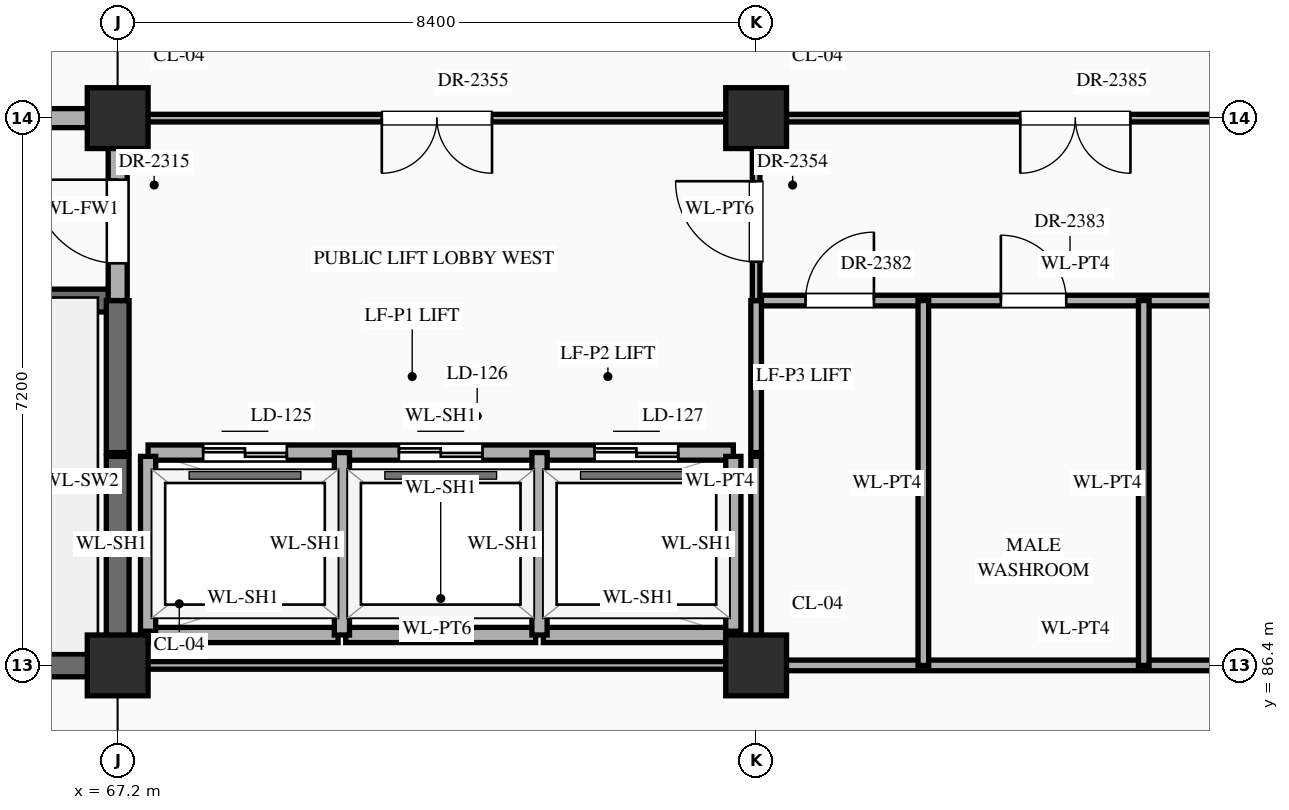
"""IFC4 building model, lengths in metres.
Left out: names, types, materials, properties, quantities, classifications, styles, units other than length and angle.
Written with IfcOpenShell. Run it as: python <this file> out.ifc"""

import sys

from ifc_helpers import new_model, si_unit, direction, frame, frame_2d, origin, origin_2d, place, context, subcontext, project, spatial, rectangle, extrude, element, fill, save


model = new_model("IFC4")
c1 = context("Model", 3, precision=1e-05, world=origin(), true_north=direction((0.0, 1.0)))
c2 = subcontext(c1, "Body", "Model", "MODEL_VIEW")
j1 = project(units=[si_unit("LENGTHUNIT", "METRE"), si_unit("PLANEANGLEUNIT", "RADIAN")], contexts=[c1])
p1 = place(None, origin())
s1 = spatial("IfcSite", under=j1, at=p1, CompositionType="ELEMENT")
p2 = place(p1, origin())
s2 = spatial("IfcBuilding", under=s1, at=p2, CompositionType="ELEMENT")
p3 = place(p2, frame((0.0, 0.0, 30.6)))
s3 = spatial("IfcBuildingStorey", under=s2, at=p3, CompositionType="ELEMENT", Elevation=30.6)
for number, where, z_axis, x_axis in (
    (1, (67.2, 86.4, 0.0), (0.0, 0.0, 1.0), (1.0, 0.0, 0.0)),
    (2, (67.2, 93.6, 0.0), (0.0, 0.0, 1.0), (1.0, 0.0, 0.0)),
    (3, (75.6, 86.4, 0.0), (0.0, 0.0, 1.0), (1.0, 0.0, 0.0)),
    (4, (75.6, 93.6, 0.0), (0.0, 0.0, 1.0), (1.0, 0.0, 0.0)),
):
    element("IfcColumn", number, at=place(p3, frame(where, z_axis=z_axis, x_axis=x_axis)), inside=s3, PredefinedType="COLUMN", context=c2, shape_type="SweptSolid", body=[
        extrude(rectangle(XDim=0.8, YDim=0.8, at=origin_2d()), origin(), (0.0, 0.0, 1.0), 4.5),
    ])
p4 = place(p3, frame((58.8, 86.4, 0.0), z_axis=(0.0, 0.0, 1.0), x_axis=(1.0, 0.0, 0.0)))
e5 = element("IfcWall", 5, at=p4, inside=s3, PredefinedType="SHEAR", context=c2, shape_type="SweptSolid", body=[
    extrude(rectangle(XDim=8.4, YDim=0.3, at=frame_2d((4.2, 0.0))), origin(), (0.0, 0.0, 1.0), 4.24),
])
p5 = place(p3, frame((67.25, 86.4, 0.0), z_axis=(0.0, 0.0, 1.0), x_axis=(1.0, 0.0, 0.0)))
e6 = element("IfcWall", 6, at=p5, inside=s3, PredefinedType="STANDARD", context=c2, shape_type="SweptSolid", body=[
    extrude(rectangle(XDim=8.3, YDim=0.1, at=frame_2d((4.15, 0.0))), origin(), (0.0, 0.0, 1.0), 3.39),
])
p6 = place(p3, frame((75.6, 86.4, 0.0), z_axis=(0.0, 0.0, 1.0), x_axis=(1.0, 0.0, 0.0)))
e7 = element("IfcWall", 7, at=p6, inside=s3, PredefinedType="STANDARD", context=c2, shape_type="SweptSolid", body=[
    extrude(rectangle(XDim=8.4, YDim=0.14, at=frame_2d((4.2, 0.0))), origin(), (0.0, 0.0, 1.0), 3.39),
])
for number, where, z_axis, x_axis in (
    (8, (67.6, 86.8, 0.0), (0.0, 0.0, 1.0), (1.0, 0.0, 0.0)),
    (9, (70.2, 86.8, 0.0), (0.0, 0.0, 1.0), (1.0, 0.0, 0.0)),
    (10, (72.8, 86.8, 0.0), (0.0, 0.0, 1.0), (1.0, 0.0, 0.0)),
):
    element("IfcWall", number, at=place(p3, frame(where, z_axis=z_axis, x_axis=x_axis)), inside=s3, PredefinedType="STANDARD", context=c2, shape_type="SweptSolid", body=[
        extrude(rectangle(XDim=2.5, YDim=0.2, at=frame_2d((1.25, 0.0))), origin(), (0.0, 0.0, 1.0), 4.24),
    ])
p7 = place(p3, frame((67.6, 89.2, 0.0), z_axis=(0.0, 0.0, 1.0), x_axis=(1.0, 0.0, 0.0)))
e11 = element("IfcWall", 11, at=p7, inside=s3, PredefinedType="STANDARD", context=c2, shape_type="SweptSolid", body=[
    extrude(rectangle(XDim=7.7, YDim=0.2, at=frame_2d((3.85, 0.0))), origin(), (0.0, 0.0, 1.0), 4.24),
])
p8 = place(p7, frame((0.725, 0.0, 0.0)))
e12 = element("IfcOpeningElement", 12, at=p8, cuts=e11, PredefinedType="OPENING", context=c2, shape_type="SweptSolid", body=[
    extrude(rectangle(XDim=1.1, YDim=2.15, at=frame_2d((0.55, 1.075))), frame((0.0, 0.112, 0.0), z_axis=(0.0, -1.0, 0.0), x_axis=(1.0, 0.0, 0.0)), (0.0, 0.0, 1.0), 0.224),
])
p9 = place(p7, frame((3.3, 0.0, 0.0)))
e13 = element("IfcOpeningElement", 13, at=p9, cuts=e11, PredefinedType="OPENING", context=c2, shape_type="SweptSolid", body=[
    extrude(rectangle(XDim=1.1, YDim=2.15, at=frame_2d((0.55, 1.075))), frame((0.0, 0.112, 0.0), z_axis=(0.0, -1.0, 0.0), x_axis=(1.0, 0.0, 0.0)), (0.0, 0.0, 1.0), 0.224),
])
p10 = place(p7, frame((5.875, 0.0, 0.0)))
e14 = element("IfcOpeningElement", 14, at=p10, cuts=e11, PredefinedType="OPENING", context=c2, shape_type="SweptSolid", body=[
    extrude(rectangle(XDim=1.1, YDim=2.15, at=frame_2d((0.55, 1.075))), frame((0.0, 0.112, 0.0), z_axis=(0.0, -1.0, 0.0), x_axis=(1.0, 0.0, 0.0)), (0.0, 0.0, 1.0), 0.224),
])
p11 = place(p3, frame((58.8, 91.2, 0.0), z_axis=(0.0, 0.0, 1.0), x_axis=(1.0, 0.0, 0.0)))
e15 = element("IfcWall", 15, at=p11, inside=s3, PredefinedType="SHEAR", context=c2, shape_type="SweptSolid", body=[
    extrude(rectangle(XDim=8.4, YDim=0.3, at=frame_2d((4.2, 0.0))), origin(), (0.0, 0.0, 1.0), 4.24),
])
p12 = place(p11, frame((0.65, 0.0, 0.0)))
e16 = element("IfcOpeningElement", 16, at=p12, cuts=e15, PredefinedType="OPENING", context=c2, shape_type="SweptSolid", body=[
    extrude(rectangle(XDim=1.1, YDim=2.2, at=frame_2d((0.55, 1.1))), frame((0.0, 0.162, 0.0), z_axis=(0.0, -1.0, 0.0), x_axis=(1.0, 0.0, 0.0)), (0.0, 0.0, 1.0), 0.324),
])
p13 = place(p3, frame((75.6, 91.2, 0.0), z_axis=(0.0, 0.0, 1.0), x_axis=(1.0, 0.0, 0.0)))
e17 = element("IfcWall", 17, at=p13, inside=s3, PredefinedType="STANDARD", context=c2, shape_type="SweptSolid", body=[
    extrude(rectangle(XDim=8.4, YDim=0.14, at=frame_2d((4.2, 0.0))), origin(), (0.0, 0.0, 1.0), 4.24),
])
p14 = place(p13, frame((0.65, 0.0, 0.0)))
e18 = element("IfcOpeningElement", 18, at=p14, cuts=e17, PredefinedType="OPENING", context=c2, shape_type="SweptSolid", body=[
    extrude(rectangle(XDim=0.9, YDim=2.15, at=frame_2d((0.45, 1.075))), frame((0.0, 0.082, 0.0), z_axis=(0.0, -1.0, 0.0), x_axis=(1.0, 0.0, 0.0)), (0.0, 0.0, 1.0), 0.164),
])
p15 = place(p13, frame((3.22, 0.0, 0.0)))
e19 = element("IfcOpeningElement", 19, at=p15, cuts=e17, PredefinedType="OPENING", context=c2, shape_type="SweptSolid", body=[
    extrude(rectangle(XDim=0.86, YDim=2.1, at=frame_2d((0.43, 1.05))), frame((0.0, 0.082, 0.0), z_axis=(0.0, -1.0, 0.0), x_axis=(1.0, 0.0, 0.0)), (0.0, 0.0, 1.0), 0.164),
])
p16 = place(p13, frame((6.32, 0.0, 0.0)))
e20 = element("IfcOpeningElement", 20, at=p16, cuts=e17, PredefinedType="OPENING", context=c2, shape_type="SweptSolid", body=[
    extrude(rectangle(XDim=0.86, YDim=2.1, at=frame_2d((0.43, 1.05))), frame((0.0, 0.082, 0.0), z_axis=(0.0, -1.0, 0.0), x_axis=(1.0, 0.0, 0.0)), (0.0, 0.0, 1.0), 0.164),
])
p17 = place(p3, frame((58.8, 93.6, 0.0), z_axis=(0.0, 0.0, 1.0), x_axis=(1.0, 0.0, 0.0)))
e21 = element("IfcWall", 21, at=p17, inside=s3, PredefinedType="STANDARD", context=c2, shape_type="SweptSolid", body=[
    extrude(rectangle(XDim=8.4, YDim=0.25, at=frame_2d((4.2, 0.0))), origin(), (0.0, 0.0, 1.0), 3.39),
])
p18 = place(p17, frame((3.2, 0.0, 0.0)))
e22 = element("IfcOpeningElement", 22, at=p18, cuts=e21, PredefinedType="OPENING", context=c2, shape_type="SweptSolid", body=[
    extrude(rectangle(XDim=2.0, YDim=2.4, at=frame_2d((1.0, 1.2))), frame((0.0, 0.137, 0.0), z_axis=(0.0, -1.0, 0.0), x_axis=(1.0, 0.0, 0.0)), (0.0, 0.0, 1.0), 0.274),
])
p19 = place(p3, frame((67.2, 93.6, 0.0), z_axis=(0.0, 0.0, 1.0), x_axis=(1.0, 0.0, 0.0)))
e23 = element("IfcWall", 23, at=p19, inside=s3, PredefinedType="STANDARD", context=c2, shape_type="SweptSolid", body=[
    extrude(rectangle(XDim=33.6, YDim=0.1, at=frame_2d((16.8, 0.0))), origin(), (0.0, 0.0, 1.0), 3.39),
])
p20 = place(p19, frame((3.475, 0.0, 0.0)))
e24 = element("IfcOpeningElement", 24, at=p20, cuts=e23, PredefinedType="OPENING", context=c2, shape_type="SweptSolid", body=[
    extrude(rectangle(XDim=1.45, YDim=2.3, at=frame_2d((0.725, 1.15))), frame((0.0, 0.062, 0.0), z_axis=(0.0, -1.0, 0.0), x_axis=(1.0, 0.0, 0.0)), (0.0, 0.0, 1.0), 0.124),
])
p21 = place(p19, frame((28.45, 0.0, 0.0)))
e25 = element("IfcOpeningElement", 25, at=p21, cuts=e23, PredefinedType="OPENING", context=c2, shape_type="SweptSolid", body=[
    extrude(rectangle(XDim=1.9, YDim=2.5, at=frame_2d((0.95, 1.25))), frame((0.0, 0.062, 0.0), z_axis=(0.0, -1.0, 0.0), x_axis=(1.0, 0.0, 0.0)), (0.0, 0.0, 1.0), 0.124),
])
p22 = place(p19, frame((11.875, 0.0, 0.0)))
e26 = element("IfcOpeningElement", 26, at=p22, cuts=e23, PredefinedType="OPENING", context=c2, shape_type="SweptSolid", body=[
    extrude(rectangle(XDim=1.45, YDim=2.3, at=frame_2d((0.725, 1.15))), frame((0.0, 0.062, 0.0), z_axis=(0.0, -1.0, 0.0), x_axis=(1.0, 0.0, 0.0)), (0.0, 0.0, 1.0), 0.124),
])
p23 = place(p19, frame((17.76, 0.0, 0.0)))
e27 = element("IfcOpeningElement", 27, at=p23, cuts=e23, PredefinedType="OPENING", context=c2, shape_type="SweptSolid", body=[
    extrude(rectangle(XDim=1.2, YDim=2.35, at=frame_2d((0.6, 1.175))), frame((0.0, 0.062, 0.0), z_axis=(0.0, -1.0, 0.0), x_axis=(1.0, 0.0, 0.0)), (0.0, 0.0, 1.0), 0.124),
])
p24 = place(p19, frame((20.38, 0.0, 0.0)))
e28 = element("IfcOpeningElement", 28, at=p24, cuts=e23, PredefinedType="OPENING", context=c2, shape_type="SweptSolid", body=[
    extrude(rectangle(XDim=1.24, YDim=2.3, at=frame_2d((0.62, 1.15))), frame((0.0, 0.062, 0.0), z_axis=(0.0, -1.0, 0.0), x_axis=(1.0, 0.0, 0.0)), (0.0, 0.0, 1.0), 0.124),
])
p25 = place(p19, frame((23.0, 0.0, 0.0)))
e29 = element("IfcOpeningElement", 29, at=p25, cuts=e23, PredefinedType="OPENING", context=c2, shape_type="SweptSolid", body=[
    extrude(rectangle(XDim=1.28, YDim=2.35, at=frame_2d((0.64, 1.175))), frame((0.0, 0.062, 0.0), z_axis=(0.0, -1.0, 0.0), x_axis=(1.0, 0.0, 0.0)), (0.0, 0.0, 1.0), 0.124),
])
p26 = place(p3, frame((67.2, 86.45, 0.0), z_axis=(0.0, 0.0, 1.0), x_axis=(0.0, 1.0, 0.0)))
e30 = element("IfcWall", 30, at=p26, inside=s3, PredefinedType="SHEAR", context=c2, shape_type="SweptSolid", body=[
    extrude(rectangle(XDim=2.7, YDim=0.3, at=frame_2d((1.35, 0.0))), origin(), (0.0, 0.0, 1.0), 4.24),
])
p27 = place(p3, frame((67.2, 89.2, 0.0), z_axis=(0.0, 0.0, 1.0), x_axis=(0.0, 1.0, 0.0)))
e31 = element("IfcWall", 31, at=p27, inside=s3, PredefinedType="SHEAR", context=c2, shape_type="SweptSolid", body=[
    extrude(rectangle(XDim=2.0, YDim=0.3, at=frame_2d((1.0, 0.0))), origin(), (0.0, 0.0, 1.0), 4.24),
])
p28 = place(p3, frame((67.2, 91.2, 0.0), z_axis=(0.0, 0.0, 1.0), x_axis=(0.0, 1.0, 0.0)))
e32 = element("IfcWall", 32, at=p28, inside=s3, PredefinedType="STANDARD", context=c2, shape_type="SweptSolid", body=[
    extrude(rectangle(XDim=2.4, YDim=0.25, at=frame_2d((1.2, 0.0))), origin(), (0.0, 0.0, 1.0), 3.49),
])
p29 = place(p28, frame((0.49, 0.0, 0.0)))
e33 = element("IfcOpeningElement", 33, at=p29, cuts=e32, PredefinedType="OPENING", context=c2, shape_type="SweptSolid", body=[
    extrude(rectangle(XDim=1.1, YDim=2.2, at=frame_2d((0.55, 1.1))), frame((0.0, 0.137, 0.0), z_axis=(0.0, -1.0, 0.0), x_axis=(1.0, 0.0, 0.0)), (0.0, 0.0, 1.0), 0.274),
])
p30 = place(p3, frame((67.6, 86.85, 0.0), z_axis=(0.0, 0.0, 1.0), x_axis=(0.0, 1.0, 0.0)))
e34 = element("IfcWall", 34, at=p30, inside=s3, PredefinedType="STANDARD", context=c2, shape_type="SweptSolid", body=[
    extrude(rectangle(XDim=2.3, YDim=0.2, at=frame_2d((1.15, 0.0))), origin(), (0.0, 0.0, 1.0), 4.24),
])
for number, where, z_axis, x_axis in (
    (35, (70.15, 86.8, 0.0), (0.0, 0.0, 1.0), (0.0, 1.0, 0.0)),
    (36, (72.75, 86.8, 0.0), (0.0, 0.0, 1.0), (0.0, 1.0, 0.0)),
):
    element("IfcWall", number, at=place(p3, frame(where, z_axis=z_axis, x_axis=x_axis)), inside=s3, PredefinedType="STANDARD", context=c2, shape_type="SweptSolid", body=[
        extrude(rectangle(XDim=2.4, YDim=0.2, at=frame_2d((1.2, 0.0))), origin(), (0.0, 0.0, 1.0), 4.24),
    ])
p31 = place(p3, frame((75.3, 86.85, 0.0), z_axis=(0.0, 0.0, 1.0), x_axis=(0.0, 1.0, 0.0)))
e37 = element("IfcWall", 37, at=p31, inside=s3, PredefinedType="STANDARD", context=c2, shape_type="SweptSolid", body=[
    extrude(rectangle(XDim=2.3, YDim=0.2, at=frame_2d((1.15, 0.0))), origin(), (0.0, 0.0, 1.0), 4.24),
])
p32 = place(p3, frame((75.6, 86.45, 0.0), z_axis=(0.0, 0.0, 1.0), x_axis=(0.0, 1.0, 0.0)))
e38 = element("IfcWall", 38, at=p32, inside=s3, PredefinedType="STANDARD", context=c2, shape_type="SweptSolid", body=[
    extrude(rectangle(XDim=2.7, YDim=0.14, at=frame_2d((1.35, 0.0))), origin(), (0.0, 0.0, 1.0), 3.49),
])
p33 = place(p3, frame((75.6, 89.2, 0.0), z_axis=(0.0, 0.0, 1.0), x_axis=(0.0, 1.0, 0.0)))
e39 = element("IfcWall", 39, at=p33, inside=s3, PredefinedType="STANDARD", context=c2, shape_type="SweptSolid", body=[
    extrude(rectangle(XDim=2.0, YDim=0.14, at=frame_2d((1.0, 0.0))), origin(), (0.0, 0.0, 1.0), 3.49),
])
p34 = place(p3, frame((75.6, 91.2, 0.0), z_axis=(0.0, 0.0, 1.0), x_axis=(0.0, 1.0, 0.0)))
e40 = element("IfcWall", 40, at=p34, inside=s3, PredefinedType="STANDARD", context=c2, shape_type="SweptSolid", body=[
    extrude(rectangle(XDim=2.4, YDim=0.1, at=frame_2d((1.2, 0.0))), origin(), (0.0, 0.0, 1.0), 3.49),
])
p35 = place(p34, frame((0.51, 0.0, 0.0)))
e41 = element("IfcOpeningElement", 41, at=p35, cuts=e40, PredefinedType="OPENING", context=c2, shape_type="SweptSolid", body=[
    extrude(rectangle(XDim=1.06, YDim=2.4, at=frame_2d((0.53, 1.2))), frame((0.0, 0.062, 0.0), z_axis=(0.0, -1.0, 0.0), x_axis=(1.0, 0.0, 0.0)), (0.0, 0.0, 1.0), 0.124),
])
for number, where, z_axis, x_axis in (
    (42, (77.8, 86.4, 0.0), (0.0, 0.0, 1.0), (0.0, 1.0, 0.0)),
    (43, (80.7, 86.4, 0.0), (0.0, 0.0, 1.0), (0.0, 1.0, 0.0)),
):
    element("IfcWall", number, at=place(p3, frame(where, z_axis=z_axis, x_axis=x_axis)), inside=s3, PredefinedType="STANDARD", context=c2, shape_type="SweptSolid", body=[
        extrude(rectangle(XDim=4.8, YDim=0.14, at=frame_2d((2.4, 0.0))), origin(), (0.0, 0.0, 1.0), 4.24),
    ])
p36 = place(p8, origin())
e44 = element("IfcDoor", 44, at=p36, inside=s3, OperationType="DOUBLE_DOOR_SLIDING", PredefinedType="DOOR", context=c2, shape_type="SweptSolid", body=[
    extrude(rectangle(XDim=1.1, YDim=2.15, at=frame_2d((0.55, 1.075))), frame((0.0, 0.025, 0.0), z_axis=(0.0, -1.0, 0.0), x_axis=(1.0, 0.0, 0.0)), (0.0, 0.0, 1.0), 0.05),
])
fill(e12, e44)
p37 = place(p9, origin())
e45 = element("IfcDoor", 45, at=p37, inside=s3, OperationType="DOUBLE_DOOR_SLIDING", PredefinedType="DOOR", context=c2, shape_type="SweptSolid", body=[
    extrude(rectangle(XDim=1.1, YDim=2.15, at=frame_2d((0.55, 1.075))), frame((0.0, 0.025, 0.0), z_axis=(0.0, -1.0, 0.0), x_axis=(1.0, 0.0, 0.0)), (0.0, 0.0, 1.0), 0.05),
])
fill(e13, e45)
p38 = place(p10, origin())
e46 = element("IfcDoor", 46, at=p38, inside=s3, OperationType="DOUBLE_DOOR_SLIDING", PredefinedType="DOOR", context=c2, shape_type="SweptSolid", body=[
    extrude(rectangle(XDim=1.1, YDim=2.15, at=frame_2d((0.55, 1.075))), frame((0.0, 0.025, 0.0), z_axis=(0.0, -1.0, 0.0), x_axis=(1.0, 0.0, 0.0)), (0.0, 0.0, 1.0), 0.05),
])
fill(e14, e46)
p39 = place(p29, origin())
e47 = element("IfcDoor", 47, at=p39, inside=s3, OperationType="SINGLE_SWING_RIGHT", PredefinedType="DOOR", context=c2, shape_type="SweptSolid", body=[
    extrude(rectangle(XDim=1.1, YDim=2.2, at=frame_2d((0.55, 1.1))), frame((0.0, 0.025, 0.0), z_axis=(0.0, -1.0, 0.0), x_axis=(1.0, 0.0, 0.0)), (0.0, 0.0, 1.0), 0.05),
])
fill(e33, e47)
p40 = place(p35, origin())
e48 = element("IfcDoor", 48, at=p40, inside=s3, OperationType="SINGLE_SWING_RIGHT", PredefinedType="DOOR", context=c2, shape_type="SweptSolid", body=[
    extrude(rectangle(XDim=1.06, YDim=2.4, at=frame_2d((0.53, 1.2))), frame((0.0, 0.025, 0.0), z_axis=(0.0, -1.0, 0.0), x_axis=(1.0, 0.0, 0.0)), (0.0, 0.0, 1.0), 0.05),
])
fill(e41, e48)
p41 = place(p20, frame((1.45, 0.0, 0.0), z_axis=(0.0, 0.0, 1.0), x_axis=(-1.0, 0.0, 0.0)))
e49 = element("IfcDoor", 49, at=p41, inside=s3, OperationType="DOUBLE_DOOR_SINGLE_SWING", PredefinedType="DOOR", context=c2, shape_type="SweptSolid", body=[
    extrude(rectangle(XDim=1.45, YDim=2.3, at=frame_2d((0.725, 1.15))), frame((0.0, 0.025, 0.0), z_axis=(0.0, -1.0, 0.0), x_axis=(1.0, 0.0, 0.0)), (0.0, 0.0, 1.0), 0.05),
])
fill(e24, e49)
p42 = place(p14, origin())
e50 = element("IfcDoor", 50, at=p42, inside=s3, OperationType="SINGLE_SWING_RIGHT", PredefinedType="DOOR", context=c2, shape_type="SweptSolid", body=[
    extrude(rectangle(XDim=0.9, YDim=2.15, at=frame_2d((0.45, 1.075))), frame((0.0, 0.025, 0.0), z_axis=(0.0, -1.0, 0.0), x_axis=(1.0, 0.0, 0.0)), (0.0, 0.0, 1.0), 0.05),
])
fill(e18, e50)
p43 = place(p15, origin())
e51 = element("IfcDoor", 51, at=p43, inside=s3, OperationType="SINGLE_SWING_LEFT", PredefinedType="DOOR", context=c2, shape_type="SweptSolid", body=[
    extrude(rectangle(XDim=0.86, YDim=2.1, at=frame_2d((0.43, 1.05))), frame((0.0, 0.025, 0.0), z_axis=(0.0, -1.0, 0.0), x_axis=(1.0, 0.0, 0.0)), (0.0, 0.0, 1.0), 0.05),
])
fill(e19, e51)
p44 = place(p22, frame((1.45, 0.0, 0.0), z_axis=(0.0, 0.0, 1.0), x_axis=(-1.0, 0.0, 0.0)))
e52 = element("IfcDoor", 52, at=p44, inside=s3, OperationType="DOUBLE_DOOR_SINGLE_SWING", PredefinedType="DOOR", context=c2, shape_type="SweptSolid", body=[
    extrude(rectangle(XDim=1.45, YDim=2.3, at=frame_2d((0.725, 1.15))), frame((0.0, 0.025, 0.0), z_axis=(0.0, -1.0, 0.0), x_axis=(1.0, 0.0, 0.0)), (0.0, 0.0, 1.0), 0.05),
])
fill(e26, e52)
save(model, sys.argv[1])
